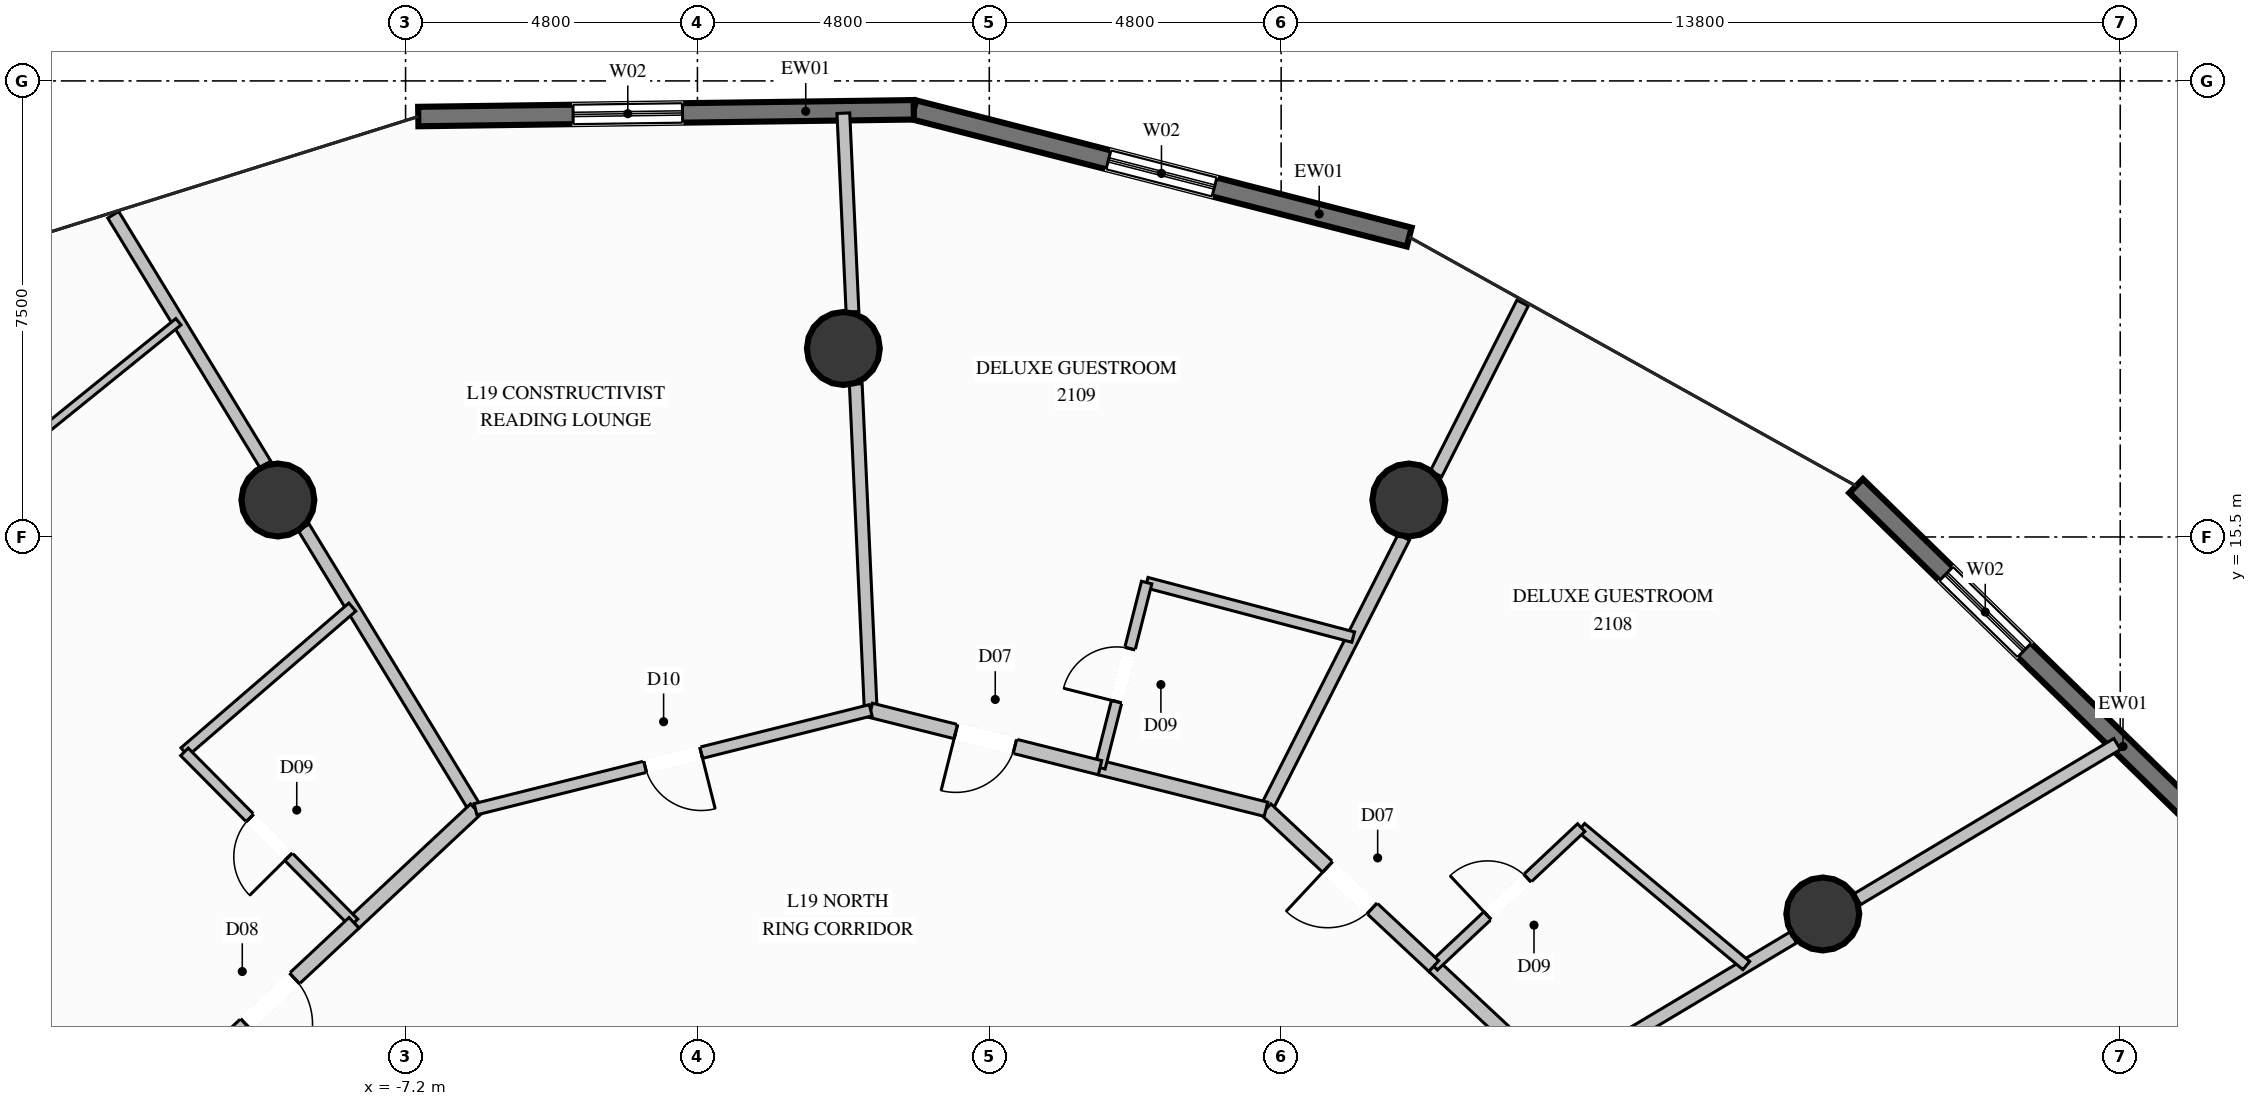
"""IFC4 building model, lengths in metres.
Left out: names, types, materials, properties, quantities, classifications, styles, units other than length and angle.
Written with IfcOpenShell. Run it as: python <this file> out.ifc"""

import sys

from ifc_helpers import new_model, si_unit, direction, frame, frame_2d, origin, origin_2d, place, context, subcontext, project, spatial, rectangle, circle, extrude, element, fill, save


model = new_model("IFC4")
c1 = context("Model", 3, precision=1e-05, world=origin(), true_north=direction((0.0, 1.0)))
c2 = subcontext(c1, "Body", "Model", "MODEL_VIEW")
j1 = project(units=[si_unit("LENGTHUNIT", "METRE"), si_unit("PLANEANGLEUNIT", "RADIAN")], contexts=[c1])
p1 = place(None, origin())
s1 = spatial("IfcSite", under=j1, at=p1, CompositionType="ELEMENT")
p2 = place(p1, origin())
s2 = spatial("IfcBuilding", under=s1, at=p2, CompositionType="ELEMENT")
p3 = place(p2, frame((0.0, 0.0, 78.8)))
s3 = spatial("IfcBuildingStorey", under=s2, at=p3, CompositionType="ELEMENT", Elevation=78.8)
for number, where, z_axis, x_axis in (
    (1, (16.108, 9.3, 0.0), (0.0, 0.0, 1.0), (1.0, 0.0, 0.0)),
    (2, (9.3, 16.108, 0.0), (0.0, 0.0, 1.0), (1.0, 0.0, 0.0)),
    (3, (0.0, 18.6, 0.0), (0.0, 0.0, 1.0), (1.0, 0.0, 0.0)),
    (4, (-9.3, 16.108, 0.0), (0.0, 0.0, 1.0), (1.0, 0.0, 0.0)),
):
    element("IfcColumn", number, at=place(p3, frame(where, z_axis=z_axis, x_axis=x_axis)), inside=s3, PredefinedType="COLUMN", context=c2, shape_type="SweptSolid", body=[
        extrude(circle(Radius=0.6, at=origin_2d()), origin(), (0.0, 0.0, 1.0), 3.6),
    ])
p4 = place(p3, frame((16.656, 16.339, 0.0), z_axis=(0.0, 0.0, 1.0), x_axis=(0.715637667014, -0.698471709914, 0.0)))
e5 = element("IfcWall", 5, at=p4, inside=s3, PredefinedType="SOLIDWALL", context=c2, shape_type="SweptSolid", body=[
    extrude(rectangle(XDim=8.149, YDim=0.32, at=frame_2d((4.075, 0.0))), origin(), (0.0, 0.0, 1.0), 3.34),
])
p5 = place(p4, frame((2.068, 0.0, 0.35)))
e6 = element("IfcOpeningElement", 6, at=p5, cuts=e5, PredefinedType="OPENING", context=c2, shape_type="SweptSolid", body=[
    extrude(rectangle(XDim=1.8, YDim=2.6, at=frame_2d((0.9, 1.3))), frame((0.0, 0.17, 0.0), z_axis=(0.0, -1.0, 0.0), x_axis=(1.0, 0.0, 0.0)), (0.0, 0.0, 1.0), 0.34),
])
p6 = place(p3, frame((1.158, 22.525, 0.0), z_axis=(0.0, 0.0, 1.0), x_axis=(0.968555100302, -0.248799151282, 0.0)))
e7 = element("IfcWall", 7, at=p6, inside=s3, PredefinedType="SOLIDWALL", context=c2, shape_type="SweptSolid", body=[
    extrude(rectangle(XDim=8.413, YDim=0.32, at=frame_2d((4.206, 0.0))), origin(), (0.0, 0.0, 1.0), 3.34),
])
p7 = place(p6, frame((3.306, 0.0, 0.35)))
e8 = element("IfcOpeningElement", 8, at=p7, cuts=e7, PredefinedType="OPENING", context=c2, shape_type="SweptSolid", body=[
    extrude(rectangle(XDim=1.8, YDim=2.6, at=frame_2d((0.9, 1.3))), frame((0.0, 0.17, 0.0), z_axis=(0.0, -1.0, 0.0), x_axis=(1.0, 0.0, 0.0)), (0.0, 0.0, 1.0), 0.34),
])
p8 = place(p3, frame((-6.991, 22.414, 0.0), z_axis=(0.0, 0.0, 1.0), x_axis=(0.999907508711, 0.013600515578, 0.0)))
e9 = element("IfcWall", 9, at=p8, inside=s3, PredefinedType="SOLIDWALL", context=c2, shape_type="SweptSolid", body=[
    extrude(rectangle(XDim=8.15, YDim=0.32, at=frame_2d((4.075, 0.0))), origin(), (0.0, 0.0, 1.0), 3.34),
])
p9 = place(p8, frame((2.546, 0.0, 0.35)))
e10 = element("IfcOpeningElement", 10, at=p9, cuts=e9, PredefinedType="OPENING", context=c2, shape_type="SweptSolid", body=[
    extrude(rectangle(XDim=1.8, YDim=2.6, at=frame_2d((0.9, 1.3))), frame((0.0, 0.17, 0.0), z_axis=(0.0, -1.0, 0.0), x_axis=(1.0, 0.0, 0.0)), (0.0, 0.0, 1.0), 0.34),
])
p10 = place(p3, frame((11.708, 6.575, 0.0), z_axis=(0.0, 0.0, 1.0), x_axis=(0.858450301557, 0.512896753506, 0.0)))
e11 = element("IfcWall", 11, at=p10, inside=s3, PredefinedType="PARTITIONING", context=c2, shape_type="SweptSolid", body=[
    extrude(rectangle(XDim=4.561, YDim=0.21, at=frame_2d((2.28, 0.0))), origin(), (0.0, 0.0, 1.0), 2.708),
])
p11 = place(p3, frame((16.678, 9.544, 0.0), z_axis=(0.0, 0.0, 1.0), x_axis=(0.858517464023, 0.512784325002, 0.0)))
e12 = element("IfcWall", 12, at=p11, inside=s3, PredefinedType="PARTITIONING", context=c2, shape_type="SweptSolid", body=[
    extrude(rectangle(XDim=4.975, YDim=0.21, at=frame_2d((2.487, 0.0))), origin(), (0.0, 0.0, 1.0), 3.34),
])
p12 = place(p3, frame((6.95, 11.022, 0.0), z_axis=(0.0, 0.0, 1.0), x_axis=(0.452173499379, 0.891930000874, 0.0)))
e13 = element("IfcWall", 13, at=p12, inside=s3, PredefinedType="PARTITIONING", context=c2, shape_type="SweptSolid", body=[
    extrude(rectangle(XDim=5.014, YDim=0.21, at=frame_2d((2.507, 0.0))), origin(), (0.0, 0.0, 1.0), 2.708),
])
p13 = place(p3, frame((9.747, 16.538, 0.0), z_axis=(0.0, 0.0, 1.0), x_axis=(0.452012486592, 0.892011609771, 0.0)))
e14 = element("IfcWall", 14, at=p13, inside=s3, PredefinedType="PARTITIONING", context=c2, shape_type="SweptSolid", body=[
    extrude(rectangle(XDim=3.15, YDim=0.21, at=frame_2d((1.575, 0.0))), origin(), (0.0, 0.0, 1.0), 3.34),
])
p14 = place(p3, frame((0.45, 12.65, 0.0), z_axis=(0.0, 0.0, 1.0), x_axis=(-0.045776762521, 0.998951694534, 0.0)))
e15 = element("IfcWall", 15, at=p14, inside=s3, PredefinedType="PARTITIONING", context=c2, shape_type="SweptSolid", body=[
    extrude(rectangle(XDim=5.371, YDim=0.21, at=frame_2d((2.685, 0.0))), origin(), (0.0, 0.0, 1.0), 2.708),
])
p15 = place(p3, frame((0.15, 19.202, 0.0), z_axis=(0.0, 0.0, 1.0), x_axis=(-0.045834308794, 0.998949055827, 0.0)))
e16 = element("IfcWall", 16, at=p15, inside=s3, PredefinedType="PARTITIONING", context=c2, shape_type="SweptSolid", body=[
    extrude(rectangle(XDim=3.271, YDim=0.21, at=frame_2d((1.635, 0.0))), origin(), (0.0, 0.0, 1.0), 3.34),
])
p16 = place(p3, frame((-6.05, 11.022, 0.0), z_axis=(0.0, 0.0, 1.0), x_axis=(-0.520436280321, 0.85390050833, 0.0)))
e17 = element("IfcWall", 17, at=p16, inside=s3, PredefinedType="PARTITIONING", context=c2, shape_type="SweptSolid", body=[
    extrude(rectangle(XDim=5.428, YDim=0.21, at=frame_2d((2.714, 0.0))), origin(), (0.0, 0.0, 1.0), 2.708),
])
p17 = place(p3, frame((-9.506, 16.693, 0.0), z_axis=(0.0, 0.0, 1.0), x_axis=(-0.52035281633, 0.853951372467, 0.0)))
e18 = element("IfcWall", 18, at=p17, inside=s3, PredefinedType="PARTITIONING", context=c2, shape_type="SweptSolid", body=[
    extrude(rectangle(XDim=4.808, YDim=0.21, at=frame_2d((2.404, 0.0))), origin(), (0.0, 0.0, 1.0), 3.34),
])
p18 = place(p3, frame((-6.05, 11.022, 0.0), z_axis=(0.0, 0.0, 1.0), x_axis=(-0.730494026404, -0.682919085535, 0.0)))
e19 = element("IfcWall", 19, at=p18, inside=s3, PredefinedType="PARTITIONING", context=c2, shape_type="SweptSolid", body=[
    extrude(rectangle(XDim=2.735, YDim=0.24, at=frame_2d((1.368, 0.0))), origin(), (0.0, 0.0, 1.0), 3.34),
])
p19 = place(p3, frame((-8.076, 14.346, 0.0), z_axis=(0.0, 0.0, 1.0), x_axis=(-0.757447652271, -0.652895898341, 0.0)))
e20 = element("IfcWall", 20, at=p19, inside=s3, PredefinedType="PLUMBINGWALL", context=c2, shape_type="SweptSolid", body=[
    extrude(rectangle(XDim=3.645, YDim=0.175, at=frame_2d((1.823, 0.0))), origin(), (0.0, 0.0, 1.0), 3.34),
])
p20 = place(p3, frame((-8.048, 9.154, 0.0), z_axis=(0.0, 0.0, 1.0), x_axis=(-0.704172573675, 0.710028863135, 0.0)))
e21 = element("IfcWall", 21, at=p20, inside=s3, PredefinedType="PLUMBINGWALL", context=c2, shape_type="SweptSolid", body=[
    extrude(rectangle(XDim=3.96, YDim=0.175, at=frame_2d((1.98, 0.0))), origin(), (0.0, 0.0, 1.0), 3.34),
])
p21 = place(p20, frame((1.53, 0.0, 0.0)))
e22 = element("IfcOpeningElement", 22, at=p21, cuts=e21, PredefinedType="OPENING", context=c2, shape_type="SweptSolid", body=[
    extrude(rectangle(XDim=0.9, YDim=2.1, at=frame_2d((0.45, 1.05))), frame((0.0, 0.098, 0.0), z_axis=(0.0, -1.0, 0.0), x_axis=(1.0, 0.0, 0.0)), (0.0, 0.0, 1.0), 0.195),
])
p22 = place(p3, frame((-8.048, 9.154, 0.0), z_axis=(0.0, 0.0, 1.0), x_axis=(-0.73064678366, -0.682755649941, 0.0)))
e23 = element("IfcWall", 23, at=p22, inside=s3, PredefinedType="PARTITIONING", context=c2, shape_type="SweptSolid", body=[
    extrude(rectangle(XDim=3.778, YDim=0.24, at=frame_2d((1.889, 0.0))), origin(), (0.0, 0.0, 1.0), 3.34),
])
p23 = place(p22, frame((1.339, 0.0, 0.0)))
e24 = element("IfcOpeningElement", 24, at=p23, cuts=e23, PredefinedType="OPENING", context=c2, shape_type="SweptSolid", body=[
    extrude(rectangle(XDim=1.1, YDim=2.3, at=frame_2d((0.55, 1.15))), frame((0.0, 0.13, 0.0), z_axis=(0.0, -1.0, 0.0), x_axis=(1.0, 0.0, 0.0)), (0.0, 0.0, 1.0), 0.26),
])
p24 = place(p3, frame((-10.936, 19.039, 0.0), z_axis=(0.0, 0.0, 1.0), x_axis=(-0.777513312779, -0.628866479033, 0.0)))
e25 = element("IfcWall", 25, at=p24, inside=s3, PredefinedType="PARTITIONING", context=c2, shape_type="SweptSolid", body=[
    extrude(rectangle(XDim=11.751, YDim=0.135, at=frame_2d((5.876, 0.0))), origin(), (0.0, 0.0, 1.0), 3.34),
])
p25 = place(p24, frame((5.401, 0.0, 0.0)))
e26 = element("IfcOpeningElement", 26, at=p25, cuts=e25, PredefinedType="OPENING", context=c2, shape_type="SweptSolid", body=[
    extrude(rectangle(XDim=0.95, YDim=2.1, at=frame_2d((0.475, 1.05))), frame((0.0, 0.078, 0.0), z_axis=(0.0, -1.0, 0.0), x_axis=(1.0, 0.0, 0.0)), (0.0, 0.0, 1.0), 0.155),
])
p26 = place(p3, frame((11.708, 6.575, 0.0), z_axis=(0.0, 0.0, 1.0), x_axis=(-0.730449499178, 0.682966711597, 0.0)))
e27 = element("IfcWall", 27, at=p26, inside=s3, PredefinedType="PARTITIONING", context=c2, shape_type="SweptSolid", body=[
    extrude(rectangle(XDim=2.735, YDim=0.24, at=frame_2d((1.368, 0.0))), origin(), (0.0, 0.0, 1.0), 3.34),
])
p27 = place(p3, frame((14.85, 8.452, 0.0), z_axis=(0.0, 0.0, 1.0), x_axis=(-0.767457100914, 0.641100302805, 0.0)))
e28 = element("IfcWall", 28, at=p27, inside=s3, PredefinedType="PLUMBINGWALL", context=c2, shape_type="SweptSolid", body=[
    extrude(rectangle(XDim=3.538, YDim=0.175, at=frame_2d((1.769, 0.0))), origin(), (0.0, 0.0, 1.0), 3.34),
])
p28 = place(p3, frame((9.71, 8.443, 0.0), z_axis=(0.0, 0.0, 1.0), x_axis=(0.729031175157, 0.684480493257, 0.0)))
e29 = element("IfcWall", 29, at=p28, inside=s3, PredefinedType="PLUMBINGWALL", context=c2, shape_type="SweptSolid", body=[
    extrude(rectangle(XDim=3.326, YDim=0.175, at=frame_2d((1.663, 0.0))), origin(), (0.0, 0.0, 1.0), 3.34),
])
p29 = place(p28, frame((1.213, 0.0, 0.0)))
e30 = element("IfcOpeningElement", 30, at=p29, cuts=e29, PredefinedType="OPENING", context=c2, shape_type="SweptSolid", body=[
    extrude(rectangle(XDim=0.9, YDim=2.1, at=frame_2d((0.45, 1.05))), frame((0.0, 0.098, 0.0), z_axis=(0.0, -1.0, 0.0), x_axis=(1.0, 0.0, 0.0)), (0.0, 0.0, 1.0), 0.195),
])
p30 = place(p3, frame((9.71, 8.443, 0.0), z_axis=(0.0, 0.0, 1.0), x_axis=(-0.730679025356, 0.682721145054, 0.0)))
e31 = element("IfcWall", 31, at=p30, inside=s3, PredefinedType="PARTITIONING", context=c2, shape_type="SweptSolid", body=[
    extrude(rectangle(XDim=3.777, YDim=0.24, at=frame_2d((1.889, 0.0))), origin(), (0.0, 0.0, 1.0), 3.34),
])
p31 = place(p30, frame((1.389, 0.0, 0.0)))
e32 = element("IfcOpeningElement", 32, at=p31, cuts=e31, PredefinedType="OPENING", context=c2, shape_type="SweptSolid", body=[
    extrude(rectangle(XDim=1.0, YDim=2.2, at=frame_2d((0.5, 1.1))), frame((0.0, 0.13, 0.0), z_axis=(0.0, -1.0, 0.0), x_axis=(1.0, 0.0, 0.0)), (0.0, 0.0, 1.0), 0.26),
])
p32 = place(p3, frame((6.95, 11.022, 0.0), z_axis=(0.0, 0.0, 1.0), x_axis=(-0.970009682466, 0.243066278865, 0.0)))
e33 = element("IfcWall", 33, at=p32, inside=s3, PredefinedType="PARTITIONING", context=c2, shape_type="SweptSolid", body=[
    extrude(rectangle(XDim=2.814, YDim=0.24, at=frame_2d((1.407, 0.0))), origin(), (0.0, 0.0, 1.0), 3.34),
])
p33 = place(p3, frame((8.385, 13.853, 0.0), z_axis=(0.0, 0.0, 1.0), x_axis=(-0.966861774652, 0.255300428351, 0.0)))
e34 = element("IfcWall", 34, at=p33, inside=s3, PredefinedType="PLUMBINGWALL", context=c2, shape_type="SweptSolid", body=[
    extrude(rectangle(XDim=3.513, YDim=0.175, at=frame_2d((1.757, 0.0))), origin(), (0.0, 0.0, 1.0), 3.34),
])
p34 = place(p3, frame((4.22, 11.706, 0.0), z_axis=(0.0, 0.0, 1.0), x_axis=(0.24465764931, 0.969609526889, 0.0)))
e35 = element("IfcWall", 35, at=p34, inside=s3, PredefinedType="PLUMBINGWALL", context=c2, shape_type="SweptSolid", body=[
    extrude(rectangle(XDim=3.139, YDim=0.175, at=frame_2d((1.57, 0.0))), origin(), (0.0, 0.0, 1.0), 3.34),
])
p35 = place(p34, frame((1.12, 0.0, 0.0)))
e36 = element("IfcOpeningElement", 36, at=p35, cuts=e35, PredefinedType="OPENING", context=c2, shape_type="SweptSolid", body=[
    extrude(rectangle(XDim=0.9, YDim=2.1, at=frame_2d((0.45, 1.05))), frame((0.0, 0.098, 0.0), z_axis=(0.0, -1.0, 0.0), x_axis=(1.0, 0.0, 0.0)), (0.0, 0.0, 1.0), 0.195),
])
p36 = place(p3, frame((4.22, 11.706, 0.0), z_axis=(0.0, 0.0, 1.0), x_axis=(-0.970061149619, 0.24286079552, 0.0)))
e37 = element("IfcWall", 37, at=p36, inside=s3, PredefinedType="PARTITIONING", context=c2, shape_type="SweptSolid", body=[
    extrude(rectangle(XDim=3.886, YDim=0.24, at=frame_2d((1.943, 0.0))), origin(), (0.0, 0.0, 1.0), 2.918),
])
p37 = place(p36, frame((1.443, 0.0, 0.0)))
e38 = element("IfcOpeningElement", 38, at=p37, cuts=e37, PredefinedType="OPENING", context=c2, shape_type="SweptSolid", body=[
    extrude(rectangle(XDim=1.0, YDim=2.2, at=frame_2d((0.5, 1.1))), frame((0.0, 0.13, 0.0), z_axis=(0.0, -1.0, 0.0), x_axis=(1.0, 0.0, 0.0)), (0.0, 0.0, 1.0), 0.26),
])
p38 = place(p3, frame((0.45, 12.65, 0.0), z_axis=(0.0, 0.0, 1.0), x_axis=(-0.970039538206, -0.242947101891, 0.0)))
e39 = element("IfcWall", 39, at=p38, inside=s3, PredefinedType="PARTITIONING", context=c2, shape_type="SweptSolid", body=[
    extrude(rectangle(XDim=6.701, YDim=0.19, at=frame_2d((3.35, 0.0))), origin(), (0.0, 0.0, 1.0), 2.918),
])
p39 = place(p38, frame((2.875, 0.0, 0.0)))
e40 = element("IfcOpeningElement", 40, at=p39, cuts=e39, PredefinedType="OPENING", context=c2, shape_type="SweptSolid", body=[
    extrude(rectangle(XDim=0.95, YDim=2.1, at=frame_2d((0.475, 1.05))), frame((0.0, 0.105, 0.0), z_axis=(0.0, -1.0, 0.0), x_axis=(1.0, 0.0, 0.0)), (0.0, 0.0, 1.0), 0.21),
])
p40 = place(p5, origin())
e41 = element("IfcWindow", 41, at=p40, inside=s3, PartitioningType="SINGLE_PANEL", PredefinedType="WINDOW", context=c2, shape_type="SweptSolid", body=[
    extrude(rectangle(XDim=1.8, YDim=2.6, at=frame_2d((0.9, 1.3))), frame((0.0, 0.03, 0.0), z_axis=(0.0, -1.0, 0.0), x_axis=(1.0, 0.0, 0.0)), (0.0, 0.0, 1.0), 0.06),
])
fill(e6, e41)
p41 = place(p7, origin())
e42 = element("IfcWindow", 42, at=p41, inside=s3, PartitioningType="SINGLE_PANEL", PredefinedType="WINDOW", context=c2, shape_type="SweptSolid", body=[
    extrude(rectangle(XDim=1.8, YDim=2.6, at=frame_2d((0.9, 1.3))), frame((0.0, 0.03, 0.0), z_axis=(0.0, -1.0, 0.0), x_axis=(1.0, 0.0, 0.0)), (0.0, 0.0, 1.0), 0.06),
])
fill(e8, e42)
p42 = place(p9, origin())
e43 = element("IfcWindow", 43, at=p42, inside=s3, PartitioningType="SINGLE_PANEL", PredefinedType="WINDOW", context=c2, shape_type="SweptSolid", body=[
    extrude(rectangle(XDim=1.8, YDim=2.6, at=frame_2d((0.9, 1.3))), frame((0.0, 0.03, 0.0), z_axis=(0.0, -1.0, 0.0), x_axis=(1.0, 0.0, 0.0)), (0.0, 0.0, 1.0), 0.06),
])
fill(e10, e43)
p43 = place(p21, origin())
e44 = element("IfcDoor", 44, at=p43, inside=s3, OperationType="SINGLE_SWING_LEFT", PredefinedType="DOOR", context=c2, shape_type="SweptSolid", body=[
    extrude(rectangle(XDim=0.9, YDim=2.1, at=frame_2d((0.45, 1.05))), frame((0.0, 0.025, 0.0), z_axis=(0.0, -1.0, 0.0), x_axis=(1.0, 0.0, 0.0)), (0.0, 0.0, 1.0), 0.05),
])
fill(e22, e44)
p44 = place(p23, origin())
e45 = element("IfcDoor", 45, at=p44, inside=s3, OperationType="SINGLE_SWING_RIGHT", PredefinedType="DOOR", context=c2, shape_type="SweptSolid", body=[
    extrude(rectangle(XDim=1.1, YDim=2.3, at=frame_2d((0.55, 1.15))), frame((0.0, 0.025, 0.0), z_axis=(0.0, -1.0, 0.0), x_axis=(1.0, 0.0, 0.0)), (0.0, 0.0, 1.0), 0.05),
])
fill(e24, e45)
p45 = place(p29, origin())
e46 = element("IfcDoor", 46, at=p45, inside=s3, OperationType="SINGLE_SWING_LEFT", PredefinedType="DOOR", context=c2, shape_type="SweptSolid", body=[
    extrude(rectangle(XDim=0.9, YDim=2.1, at=frame_2d((0.45, 1.05))), frame((0.0, 0.025, 0.0), z_axis=(0.0, -1.0, 0.0), x_axis=(1.0, 0.0, 0.0)), (0.0, 0.0, 1.0), 0.05),
])
fill(e30, e46)
p46 = place(p31, origin())
e47 = element("IfcDoor", 47, at=p46, inside=s3, OperationType="SINGLE_SWING_RIGHT", PredefinedType="DOOR", context=c2, shape_type="SweptSolid", body=[
    extrude(rectangle(XDim=1.0, YDim=2.2, at=frame_2d((0.5, 1.1))), frame((0.0, 0.025, 0.0), z_axis=(0.0, -1.0, 0.0), x_axis=(1.0, 0.0, 0.0)), (0.0, 0.0, 1.0), 0.05),
])
fill(e32, e47)
p47 = place(p35, origin())
e48 = element("IfcDoor", 48, at=p47, inside=s3, OperationType="SINGLE_SWING_LEFT", PredefinedType="DOOR", context=c2, shape_type="SweptSolid", body=[
    extrude(rectangle(XDim=0.9, YDim=2.1, at=frame_2d((0.45, 1.05))), frame((0.0, 0.025, 0.0), z_axis=(0.0, -1.0, 0.0), x_axis=(1.0, 0.0, 0.0)), (0.0, 0.0, 1.0), 0.05),
])
fill(e36, e48)
p48 = place(p37, origin())
e49 = element("IfcDoor", 49, at=p48, inside=s3, OperationType="SINGLE_SWING_RIGHT", PredefinedType="DOOR", context=c2, shape_type="SweptSolid", body=[
    extrude(rectangle(XDim=1.0, YDim=2.2, at=frame_2d((0.5, 1.1))), frame((0.0, 0.025, 0.0), z_axis=(0.0, -1.0, 0.0), x_axis=(1.0, 0.0, 0.0)), (0.0, 0.0, 1.0), 0.05),
])
fill(e38, e49)
p49 = place(p39, origin())
e50 = element("IfcDoor", 50, at=p49, inside=s3, OperationType="SINGLE_SWING_LEFT", PredefinedType="DOOR", context=c2, shape_type="SweptSolid", body=[
    extrude(rectangle(XDim=0.95, YDim=2.1, at=frame_2d((0.475, 1.05))), frame((0.0, 0.025, 0.0), z_axis=(0.0, -1.0, 0.0), x_axis=(1.0, 0.0, 0.0)), (0.0, 0.0, 1.0), 0.05),
])
fill(e40, e50)
save(model, sys.argv[1])
